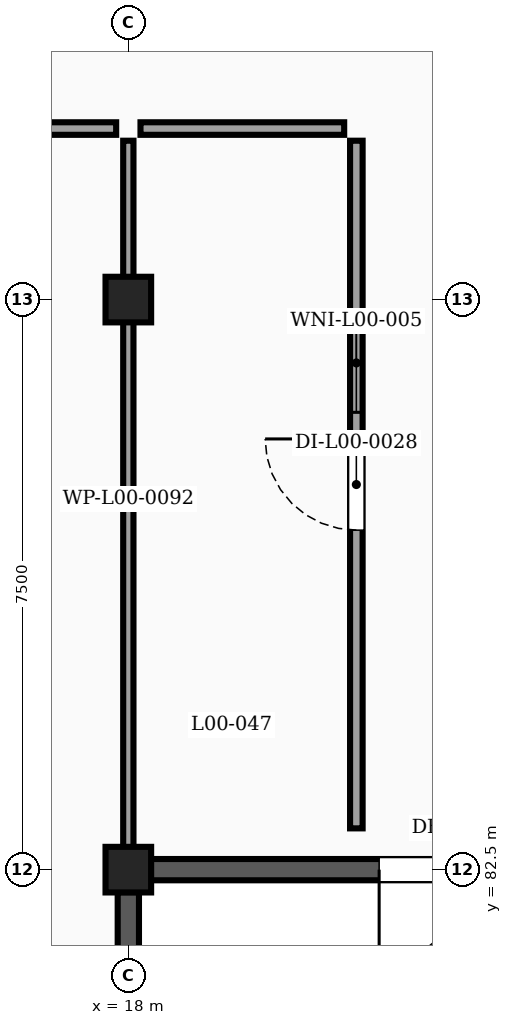
"""IFC4 building model, lengths in metres.
Left out: names, types, materials, properties, quantities, classifications, styles, units other than length and angle.
Written with IfcOpenShell. Run it as: python <this file> out.ifc"""

import sys

from ifc_helpers import new_model, si_unit, direction, frame, frame_2d, origin, origin_2d, place, context, subcontext, project, spatial, rectangle, extrude, element, fill, save


model = new_model("IFC4")
c1 = context("Model", 3, precision=1e-05, world=origin(), true_north=direction((0.0, 1.0)))
c2 = subcontext(c1, "Body", "Model", "MODEL_VIEW")
j1 = project(units=[si_unit("LENGTHUNIT", "METRE"), si_unit("PLANEANGLEUNIT", "RADIAN")], contexts=[c1])
p1 = place(None, origin())
s1 = spatial("IfcSite", under=j1, at=p1, CompositionType="ELEMENT")
p2 = place(p1, origin())
s2 = spatial("IfcBuilding", under=s1, at=p2, CompositionType="ELEMENT")
p3 = place(p2, origin())
s3 = spatial("IfcBuildingStorey", under=s2, at=p3, CompositionType="ELEMENT", Elevation=0.0)
for number, where, z_axis, x_axis in (
    (1, (18.0, 82.5, -0.25), (0.0, 0.0, 1.0), (1.0, 0.0, 0.0)),
    (2, (18.0, 90.0, -0.25), (0.0, 0.0, 1.0), (1.0, 0.0, 0.0)),
):
    element("IfcColumn", number, at=place(p3, frame(where, z_axis=z_axis, x_axis=x_axis)), inside=s3, PredefinedType="COLUMN", context=c2, shape_type="SweptSolid", body=[
        extrude(rectangle(XDim=0.6, YDim=0.6, at=origin_2d()), origin(), (0.0, 0.0, 1.0), 4.75),
    ])
p4 = place(p3, frame((26.704, 82.5, 0.0), z_axis=(0.0, 0.0, 1.0), x_axis=(-1.0, 0.0, 0.0)))
e3 = element("IfcWall", 3, at=p4, inside=s3, PredefinedType="SOLIDWALL", context=c2, shape_type="SweptSolid", body=[
    extrude(rectangle(XDim=8.408, YDim=0.28, at=frame_2d((4.204, 0.0))), origin(), (0.0, 0.0, 1.0), 3.442),
])
p5 = place(p4, frame((3.004, 0.0, 0.0)))
e4 = element("IfcOpeningElement", 4, at=p5, cuts=e3, PredefinedType="OPENING", context=c2, shape_type="SweptSolid", body=[
    extrude(rectangle(XDim=2.4, YDim=2.25, at=frame_2d((1.2, 1.125))), frame((0.0, 0.15, 0.0), z_axis=(0.0, -1.0, 0.0), x_axis=(1.0, 0.0, 0.0)), (0.0, 0.0, 1.0), 0.3),
])
p6 = place(p3, frame((18.0, 82.204, 0.0), z_axis=(0.0, 0.0, 1.0), x_axis=(0.0, -1.0, 0.0)))
e5 = element("IfcWall", 5, at=p6, inside=s3, PredefinedType="SOLIDWALL", context=c2, shape_type="SweptSolid", body=[
    extrude(rectangle(XDim=6.908, YDim=0.28, at=frame_2d((3.454, 0.0))), origin(), (0.0, 0.0, 1.0), 3.442),
])
p7 = place(p6, frame((2.254, 0.0, 0.0)))
e6 = element("IfcOpeningElement", 6, at=p7, cuts=e5, PredefinedType="OPENING", context=c2, shape_type="SweptSolid", body=[
    extrude(rectangle(XDim=2.4, YDim=2.25, at=frame_2d((1.2, 1.125))), frame((0.0, 0.15, 0.0), z_axis=(0.0, -1.0, 0.0), x_axis=(1.0, 0.0, 0.0)), (0.0, 0.0, 1.0), 0.3),
])
p8 = place(p3, frame((17.84, 92.25, 0.0), z_axis=(0.0, 0.0, 1.0), x_axis=(-1.0, 0.0, 0.0)))
e7 = element("IfcWall", 7, at=p8, inside=s3, PredefinedType="PARTITIONING", context=c2, shape_type="SweptSolid", body=[
    extrude(rectangle(XDim=4.34, YDim=0.165, at=frame_2d((2.17, 0.0))), origin(), (0.0, 0.0, 1.0), 4.1),
])
p9 = place(p8, frame((1.47, 0.0, 0.0)))
e8 = element("IfcOpeningElement", 8, at=p9, cuts=e7, PredefinedType="OPENING", context=c2, shape_type="SweptSolid", body=[
    extrude(rectangle(XDim=1.4, YDim=2.15, at=frame_2d((0.7, 1.075))), frame((0.0, 0.093, 0.0), z_axis=(0.0, -1.0, 0.0), x_axis=(1.0, 0.0, 0.0)), (0.0, 0.0, 1.0), 0.185),
])
p10 = place(p3, frame((21.0, 83.043, 0.0), z_axis=(0.0, 0.0, 1.0), x_axis=(0.0, 1.0, 0.0)))
e9 = element("IfcWall", 9, at=p10, inside=s3, PredefinedType="PARTITIONING", context=c2, shape_type="SweptSolid", body=[
    extrude(rectangle(XDim=9.047, YDim=0.165, at=frame_2d((4.523, 0.0))), origin(), (0.0, 0.0, 1.0), 3.642),
])
p11 = place(p10, frame((3.924, 0.0, 0.0)))
e10 = element("IfcOpeningElement", 10, at=p11, cuts=e9, PredefinedType="OPENING", context=c2, shape_type="SweptSolid", body=[
    extrude(rectangle(XDim=1.2, YDim=2.15, at=frame_2d((0.6, 1.075))), frame((0.0, 0.093, 0.0), z_axis=(0.0, -1.0, 0.0), x_axis=(1.0, 0.0, 0.0)), (0.0, 0.0, 1.0), 0.185),
])
p12 = place(p10, frame((5.473, 0.0, 1.02)))
e11 = element("IfcOpeningElement", 11, at=p12, cuts=e9, PredefinedType="OPENING", context=c2, shape_type="SweptSolid", body=[
    extrude(rectangle(XDim=1.3, YDim=1.18, at=frame_2d((0.65, 0.59))), frame((0.0, 0.093, 0.0), z_axis=(0.0, -1.0, 0.0), x_axis=(1.0, 0.0, 0.0)), (0.0, 0.0, 1.0), 0.185),
])
p13 = place(p3, frame((20.84, 92.25, 0.0), z_axis=(0.0, 0.0, 1.0), x_axis=(-1.0, 0.0, 0.0)))
e12 = element("IfcWall", 12, at=p13, inside=s3, PredefinedType="PARTITIONING", context=c2, shape_type="SweptSolid", body=[
    extrude(rectangle(XDim=2.68, YDim=0.165, at=frame_2d((1.34, 0.0))), origin(), (0.0, 0.0, 1.0), 4.1),
])
p14 = place(p3, frame((18.0, 82.66, 0.0), z_axis=(0.0, 0.0, 1.0), x_axis=(0.0, 1.0, 0.0)))
e13 = element("IfcWall", 13, at=p14, inside=s3, PredefinedType="PARTITIONING", context=c2, shape_type="SweptSolid", body=[
    extrude(rectangle(XDim=9.43, YDim=0.135, at=frame_2d((4.715, 0.0))), origin(), (0.0, 0.0, 1.0), 3.192),
])
p15 = place(p5, origin())
e14 = element("IfcDoor", 14, at=p15, inside=s3, OperationType="DOUBLE_DOOR_SINGLE_SWING", PredefinedType="DOOR", context=c2, shape_type="SweptSolid", body=[
    extrude(rectangle(XDim=2.4, YDim=2.25, at=frame_2d((1.2, 1.125))), frame((0.0, 0.025, 0.0), z_axis=(0.0, -1.0, 0.0), x_axis=(1.0, 0.0, 0.0)), (0.0, 0.0, 1.0), 0.05),
])
fill(e4, e14)
p16 = place(p11, origin())
e15 = element("IfcDoor", 15, at=p16, inside=s3, OperationType="SINGLE_SWING_RIGHT", PredefinedType="DOOR", context=c2, shape_type="SweptSolid", body=[
    extrude(rectangle(XDim=1.2, YDim=2.15, at=frame_2d((0.6, 1.075))), frame((0.0, 0.025, 0.0), z_axis=(0.0, -1.0, 0.0), x_axis=(1.0, 0.0, 0.0)), (0.0, 0.0, 1.0), 0.05),
])
fill(e10, e15)
p17 = place(p12, origin())
e16 = element("IfcWindow", 16, at=p17, inside=s3, PartitioningType="DOUBLE_PANEL_VERTICAL", PredefinedType="WINDOW", context=c2, shape_type="SweptSolid", body=[
    extrude(rectangle(XDim=1.3, YDim=1.18, at=frame_2d((0.65, 0.59))), frame((0.0, 0.03, 0.0), z_axis=(0.0, -1.0, 0.0), x_axis=(1.0, 0.0, 0.0)), (0.0, 0.0, 1.0), 0.06),
])
fill(e11, e16)
save(model, sys.argv[1])
